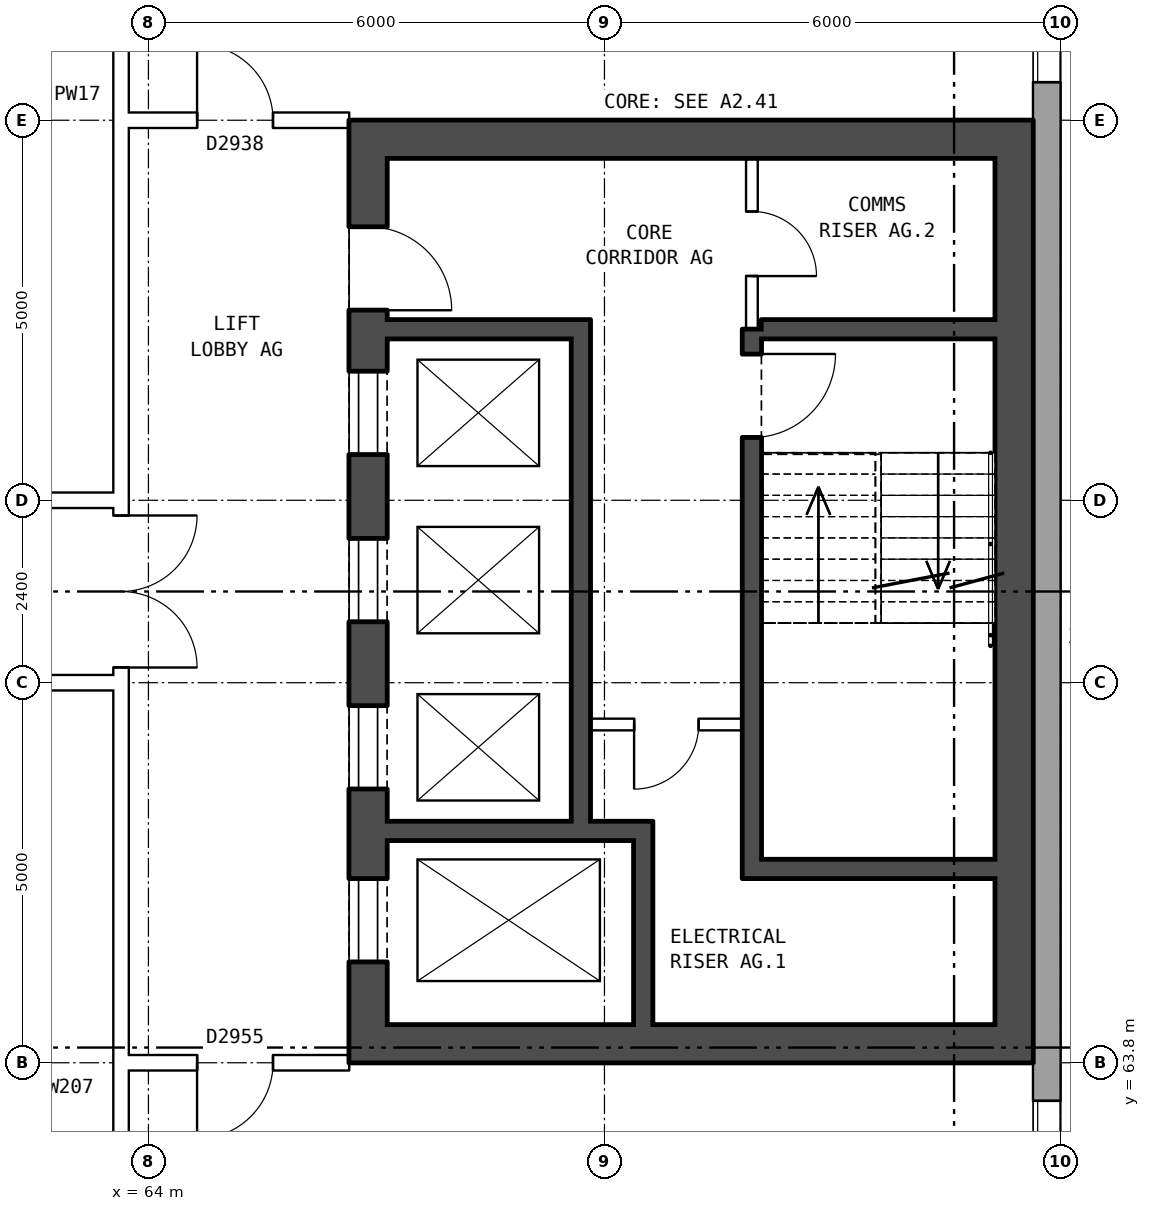
"""IFC4 building model, lengths in metres.
Left out: names, types, materials, properties, quantities, classifications, styles, units other than length and angle.
Written with IfcOpenShell. Run it as: python <this file> out.ifc"""

import sys

from ifc_helpers import new_model, si_unit, direction, frame, frame_2d, origin, place, context, subcontext, project, spatial, rectangle, extrude, element, fill, save


model = new_model("IFC4")
c1 = context("Model", 3, precision=1e-05, world=origin(), true_north=direction((0.0, 1.0)))
c2 = subcontext(c1, "Body", "Model", "MODEL_VIEW")
j1 = project(units=[si_unit("LENGTHUNIT", "METRE"), si_unit("PLANEANGLEUNIT", "RADIAN")], contexts=[c1])
p1 = place(None, origin())
s1 = spatial("IfcSite", under=j1, at=p1, CompositionType="ELEMENT")
p2 = place(p1, origin())
s2 = spatial("IfcBuilding", under=s1, at=p2, CompositionType="ELEMENT")
p3 = place(p2, frame((0.0, 0.0, 142.3)))
s3 = spatial("IfcBuildingStorey", under=s2, at=p3, CompositionType="ELEMENT", Elevation=142.3)
p4 = place(p3, frame((75.82, 57.075, 0.0), z_axis=(0.0, 0.0, 1.0), x_axis=(0.0, 1.0, 0.0)))
e1 = element("IfcWall", 1, at=p4, inside=s3, PredefinedType="STANDARD", context=c2, shape_type="SweptSolid", body=[
    extrude(rectangle(XDim=25.851, YDim=0.36, at=frame_2d((12.925, 0.0))), origin(), (0.0, 0.0, 1.0), 5.6),
])
p5 = place(p4, frame((1.625, 0.0, 0.15)))
e2 = element("IfcOpeningElement", 2, at=p5, cuts=e1, PredefinedType="OPENING", context=c2, shape_type="SweptSolid", body=[
    extrude(rectangle(XDim=1.6, YDim=2.4, at=frame_2d((0.8, 1.2))), frame((0.0, 0.19, 0.0), z_axis=(0.0, -1.0, 0.0), x_axis=(1.0, 0.0, 0.0)), (0.0, 0.0, 1.0), 0.38),
])
p6 = place(p4, frame((4.625, 0.0, 0.15)))
e3 = element("IfcOpeningElement", 3, at=p6, cuts=e1, PredefinedType="OPENING", context=c2, shape_type="SweptSolid", body=[
    extrude(rectangle(XDim=1.6, YDim=2.4, at=frame_2d((0.8, 1.2))), frame((0.0, 0.19, 0.0), z_axis=(0.0, -1.0, 0.0), x_axis=(1.0, 0.0, 0.0)), (0.0, 0.0, 1.0), 0.38),
])
p7 = place(p4, frame((19.625, 0.0, 0.15)))
e4 = element("IfcOpeningElement", 4, at=p7, cuts=e1, PredefinedType="OPENING", context=c2, shape_type="SweptSolid", body=[
    extrude(rectangle(XDim=1.6, YDim=2.4, at=frame_2d((0.8, 1.2))), frame((0.0, 0.19, 0.0), z_axis=(0.0, -1.0, 0.0), x_axis=(1.0, 0.0, 0.0)), (0.0, 0.0, 1.0), 0.38),
])
p8 = place(p4, frame((22.625, 0.0, 0.15)))
e5 = element("IfcOpeningElement", 5, at=p8, cuts=e1, PredefinedType="OPENING", context=c2, shape_type="SweptSolid", body=[
    extrude(rectangle(XDim=1.6, YDim=2.4, at=frame_2d((0.8, 1.2))), frame((0.0, 0.19, 0.0), z_axis=(0.0, -1.0, 0.0), x_axis=(1.0, 0.0, 0.0)), (0.0, 0.0, 1.0), 0.38),
])
p9 = place(p3, frame((66.89, 63.8, 0.0), z_axis=(0.0, 0.0, 1.0), x_axis=(0.0, 1.0, 0.0)))
e6 = element("IfcWall", 6, at=p9, inside=s3, PredefinedType="SHEAR", context=c2, shape_type="SweptSolid", body=[
    extrude(rectangle(XDim=12.4, YDim=0.5, at=frame_2d((6.2, 0.0))), origin(), (0.0, 0.0, 1.0), 5.6),
])
p10 = place(p9, frame((1.325, 0.0, 0.0)))
e7 = element("IfcOpeningElement", 7, at=p10, cuts=e6, PredefinedType="OPENING", context=c2, shape_type="SweptSolid", body=[
    extrude(rectangle(XDim=1.1, YDim=2.1, at=frame_2d((0.55, 1.05))), frame((0.0, 0.26, 0.0), z_axis=(0.0, -1.0, 0.0), x_axis=(1.0, 0.0, 0.0)), (0.0, 0.0, 1.0), 0.52),
])
p11 = place(p9, frame((3.6, 0.0, 0.0)))
e8 = element("IfcOpeningElement", 8, at=p11, cuts=e6, PredefinedType="OPENING", context=c2, shape_type="SweptSolid", body=[
    extrude(rectangle(XDim=1.1, YDim=2.1, at=frame_2d((0.55, 1.05))), frame((0.0, 0.26, 0.0), z_axis=(0.0, -1.0, 0.0), x_axis=(1.0, 0.0, 0.0)), (0.0, 0.0, 1.0), 0.52),
])
p12 = place(p9, frame((5.8, 0.0, 0.0)))
e9 = element("IfcOpeningElement", 9, at=p12, cuts=e6, PredefinedType="OPENING", context=c2, shape_type="SweptSolid", body=[
    extrude(rectangle(XDim=1.1, YDim=2.1, at=frame_2d((0.55, 1.05))), frame((0.0, 0.26, 0.0), z_axis=(0.0, -1.0, 0.0), x_axis=(1.0, 0.0, 0.0)), (0.0, 0.0, 1.0), 0.52),
])
p13 = place(p9, frame((8.0, 0.0, 0.0)))
e10 = element("IfcOpeningElement", 10, at=p13, cuts=e6, PredefinedType="OPENING", context=c2, shape_type="SweptSolid", body=[
    extrude(rectangle(XDim=1.1, YDim=2.1, at=frame_2d((0.55, 1.05))), frame((0.0, 0.26, 0.0), z_axis=(0.0, -1.0, 0.0), x_axis=(1.0, 0.0, 0.0)), (0.0, 0.0, 1.0), 0.52),
])
p14 = place(p9, frame((9.9, 0.0, 0.0)))
e11 = element("IfcOpeningElement", 11, at=p14, cuts=e6, PredefinedType="OPENING", context=c2, shape_type="SweptSolid", body=[
    extrude(rectangle(XDim=1.1, YDim=2.1, at=frame_2d((0.55, 1.05))), frame((0.0, 0.26, 0.0), z_axis=(0.0, -1.0, 0.0), x_axis=(1.0, 0.0, 0.0)), (0.0, 0.0, 1.0), 0.52),
])
p15 = place(p3, frame((75.39, 63.8, 0.0), z_axis=(0.0, 0.0, 1.0), x_axis=(0.0, 1.0, 0.0)))
e12 = element("IfcWall", 12, at=p15, inside=s3, PredefinedType="SHEAR", context=c2, shape_type="SweptSolid", body=[
    extrude(rectangle(XDim=12.4, YDim=0.5, at=frame_2d((6.2, 0.0))), origin(), (0.0, 0.0, 1.0), 5.6),
])
for number, where, z_axis, x_axis in (
    (13, (67.14, 64.05, 0.0), (0.0, 0.0, 1.0), (1.0, 0.0, 0.0)),
    (14, (67.14, 75.95, 0.0), (0.0, 0.0, 1.0), (1.0, 0.0, 0.0)),
):
    element("IfcWall", number, at=place(p3, frame(where, z_axis=z_axis, x_axis=x_axis)), inside=s3, PredefinedType="SHEAR", context=c2, shape_type="SweptSolid", body=[
        extrude(rectangle(XDim=8.0, YDim=0.5, at=frame_2d((4.0, 0.0))), origin(), (0.0, 0.0, 1.0), 5.6),
    ])
p16 = place(p3, frame((72.065, 66.35, 0.0), z_axis=(0.0, 0.0, 1.0), x_axis=(1.0, 0.0, 0.0)))
e15 = element("IfcWall", 15, at=p16, inside=s3, PredefinedType="SHEAR", context=c2, shape_type="SweptSolid", body=[
    extrude(rectangle(XDim=3.075, YDim=0.25, at=frame_2d((1.538, 0.0))), origin(), (0.0, 0.0, 1.0), 5.6),
])
p17 = place(p3, frame((67.14, 66.85, 0.0), z_axis=(0.0, 0.0, 1.0), x_axis=(1.0, 0.0, 0.0)))
e16 = element("IfcWall", 16, at=p17, inside=s3, PredefinedType="SHEAR", context=c2, shape_type="SweptSolid", body=[
    extrude(rectangle(XDim=3.495, YDim=0.25, at=frame_2d((1.748, 0.0))), origin(), (0.0, 0.0, 1.0), 5.6),
])
p18 = place(p3, frame((69.815, 68.25, 0.0), z_axis=(0.0, 0.0, 1.0), x_axis=(1.0, 0.0, 0.0)))
e17 = element("IfcWall", 17, at=p18, inside=s3, PredefinedType="PARTITIONING", context=c2, shape_type="SweptSolid", body=[
    extrude(rectangle(XDim=2.0, YDim=0.15, at=frame_2d((1.0, 0.0))), origin(), (0.0, 0.0, 1.0), 5.6),
])
p19 = place(p18, frame((0.575, 0.0, 0.0)))
e18 = element("IfcOpeningElement", 18, at=p19, cuts=e17, PredefinedType="OPENING", context=c2, shape_type="SweptSolid", body=[
    extrude(rectangle(XDim=0.85, YDim=2.1, at=frame_2d((0.425, 1.05))), frame((0.0, 0.085, 0.0), z_axis=(0.0, -1.0, 0.0), x_axis=(1.0, 0.0, 0.0)), (0.0, 0.0, 1.0), 0.17),
])
p20 = place(p3, frame((67.14, 73.45, 0.0), z_axis=(0.0, 0.0, 1.0), x_axis=(1.0, 0.0, 0.0)))
e19 = element("IfcWall", 19, at=p20, inside=s3, PredefinedType="SHEAR", context=c2, shape_type="SweptSolid", body=[
    extrude(rectangle(XDim=2.425, YDim=0.25, at=frame_2d((1.212, 0.0))), origin(), (0.0, 0.0, 1.0), 5.6),
])
p21 = place(p3, frame((72.065, 73.45, 0.0), z_axis=(0.0, 0.0, 1.0), x_axis=(1.0, 0.0, 0.0)))
e20 = element("IfcWall", 20, at=p21, inside=s3, PredefinedType="SHEAR", context=c2, shape_type="SweptSolid", body=[
    extrude(rectangle(XDim=3.075, YDim=0.25, at=frame_2d((1.538, 0.0))), origin(), (0.0, 0.0, 1.0), 5.6),
])
p22 = place(p3, frame((69.69, 66.975, 0.0), z_axis=(0.0, 0.0, 1.0), x_axis=(0.0, 1.0, 0.0)))
e21 = element("IfcWall", 21, at=p22, inside=s3, PredefinedType="SHEAR", context=c2, shape_type="SweptSolid", body=[
    extrude(rectangle(XDim=6.6, YDim=0.25, at=frame_2d((3.3, 0.0))), origin(), (0.0, 0.0, 1.0), 5.6),
])
p23 = place(p3, frame((70.51, 64.3, 0.0), z_axis=(0.0, 0.0, 1.0), x_axis=(0.0, 1.0, 0.0)))
e22 = element("IfcWall", 22, at=p23, inside=s3, PredefinedType="SHEAR", context=c2, shape_type="SweptSolid", body=[
    extrude(rectangle(XDim=2.425, YDim=0.25, at=frame_2d((1.212, 0.0))), origin(), (0.0, 0.0, 1.0), 5.6),
])
p24 = place(p3, frame((71.94, 66.225, 0.0), z_axis=(0.0, 0.0, 1.0), x_axis=(0.0, 1.0, 0.0)))
e23 = element("IfcWall", 23, at=p24, inside=s3, PredefinedType="SHEAR", context=c2, shape_type="SweptSolid", body=[
    extrude(rectangle(XDim=7.225, YDim=0.25, at=frame_2d((3.612, 0.0))), origin(), (0.0, 0.0, 1.0), 5.6),
])
p25 = place(p24, frame((5.8, 0.0, 0.0)))
e24 = element("IfcOpeningElement", 24, at=p25, cuts=e23, PredefinedType="OPENING", context=c2, shape_type="SweptSolid", body=[
    extrude(rectangle(XDim=1.1, YDim=2.1, at=frame_2d((0.55, 1.05))), frame((0.0, 0.135, 0.0), z_axis=(0.0, -1.0, 0.0), x_axis=(1.0, 0.0, 0.0)), (0.0, 0.0, 1.0), 0.27),
])
p26 = place(p3, frame((71.94, 73.45, 0.0), z_axis=(0.0, 0.0, 1.0), x_axis=(0.0, 1.0, 0.0)))
e25 = element("IfcWall", 25, at=p26, inside=s3, PredefinedType="PARTITIONING", context=c2, shape_type="SweptSolid", body=[
    extrude(rectangle(XDim=2.25, YDim=0.15, at=frame_2d((1.125, 0.0))), origin(), (0.0, 0.0, 1.0), 5.6),
])
p27 = place(p26, frame((0.7, 0.0, 0.0)))
e26 = element("IfcOpeningElement", 26, at=p27, cuts=e25, PredefinedType="OPENING", context=c2, shape_type="SweptSolid", body=[
    extrude(rectangle(XDim=0.85, YDim=2.1, at=frame_2d((0.425, 1.05))), frame((0.0, 0.085, 0.0), z_axis=(0.0, -1.0, 0.0), x_axis=(1.0, 0.0, 0.0)), (0.0, 0.0, 1.0), 0.17),
])
p28 = place(p3, frame((63.64, 63.9, 0.0), z_axis=(0.0, 0.0, 1.0), x_axis=(0.0, 1.0, 0.0)))
e27 = element("IfcWall", 27, at=p28, inside=s3, PredefinedType="PARTITIONING", context=c2, shape_type="SweptSolid", body=[
    extrude(rectangle(XDim=12.2, YDim=0.2, at=frame_2d((6.1, 0.0))), origin(), (0.0, 0.0, 1.0), 5.6),
])
p29 = place(p28, frame((5.1, 0.0, 0.0)))
e28 = element("IfcOpeningElement", 28, at=p29, cuts=e27, PredefinedType="OPENING", context=c2, shape_type="SweptSolid", body=[
    extrude(rectangle(XDim=2.0, YDim=2.1, at=frame_2d((1.0, 1.05))), frame((0.0, 0.11, 0.0), z_axis=(0.0, -1.0, 0.0), x_axis=(1.0, 0.0, 0.0)), (0.0, 0.0, 1.0), 0.22),
])
p30 = place(p3, frame((63.54, 63.8, 0.0), z_axis=(0.0, 0.0, 1.0), x_axis=(1.0, 0.0, 0.0)))
e29 = element("IfcWall", 29, at=p30, inside=s3, PredefinedType="PARTITIONING", context=c2, shape_type="SweptSolid", body=[
    extrude(rectangle(XDim=3.1, YDim=0.2, at=frame_2d((1.55, 0.0))), origin(), (0.0, 0.0, 1.0), 5.6),
])
p31 = place(p30, frame((1.1, 0.0, 0.0)))
e30 = element("IfcOpeningElement", 30, at=p31, cuts=e29, PredefinedType="OPENING", context=c2, shape_type="SweptSolid", body=[
    extrude(rectangle(XDim=1.0, YDim=2.1, at=frame_2d((0.5, 1.05))), frame((0.0, 0.11, 0.0), z_axis=(0.0, -1.0, 0.0), x_axis=(1.0, 0.0, 0.0)), (0.0, 0.0, 1.0), 0.22),
])
p32 = place(p3, frame((44.36, 68.8, 0.0), z_axis=(0.0, 0.0, 1.0), x_axis=(1.0, 0.0, 0.0)))
e31 = element("IfcWall", 31, at=p32, inside=s3, PredefinedType="PARTITIONING", context=c2, shape_type="SweptSolid", body=[
    extrude(rectangle(XDim=19.28, YDim=0.2, at=frame_2d((9.64, 0.0))), origin(), (0.0, 0.0, 1.0), 5.6),
])
p33 = place(p32, frame((6.32, 0.0, 0.0)))
e32 = element("IfcOpeningElement", 32, at=p33, cuts=e31, PredefinedType="OPENING", context=c2, shape_type="SweptSolid", body=[
    extrude(rectangle(XDim=1.0, YDim=2.1, at=frame_2d((0.5, 1.05))), frame((0.0, 0.11, 0.0), z_axis=(0.0, -1.0, 0.0), x_axis=(1.0, 0.0, 0.0)), (0.0, 0.0, 1.0), 0.22),
])
p34 = place(p3, frame((44.36, 71.2, 0.0), z_axis=(0.0, 0.0, 1.0), x_axis=(1.0, 0.0, 0.0)))
e33 = element("IfcWall", 33, at=p34, inside=s3, PredefinedType="PARTITIONING", context=c2, shape_type="SweptSolid", body=[
    extrude(rectangle(XDim=19.28, YDim=0.2, at=frame_2d((9.64, 0.0))), origin(), (0.0, 0.0, 1.0), 5.6),
])
p35 = place(p34, frame((8.64, 0.0, 0.0)))
e34 = element("IfcOpeningElement", 34, at=p35, cuts=e33, PredefinedType="OPENING", context=c2, shape_type="SweptSolid", body=[
    extrude(rectangle(XDim=1.0, YDim=2.1, at=frame_2d((0.5, 1.05))), frame((0.0, 0.11, 0.0), z_axis=(0.0, -1.0, 0.0), x_axis=(1.0, 0.0, 0.0)), (0.0, 0.0, 1.0), 0.22),
])
p36 = place(p3, frame((63.54, 76.2, 0.0), z_axis=(0.0, 0.0, 1.0), x_axis=(1.0, 0.0, 0.0)))
e35 = element("IfcWall", 35, at=p36, inside=s3, PredefinedType="PARTITIONING", context=c2, shape_type="SweptSolid", body=[
    extrude(rectangle(XDim=3.1, YDim=0.2, at=frame_2d((1.55, 0.0))), origin(), (0.0, 0.0, 1.0), 5.6),
])
p37 = place(p36, frame((1.1, 0.0, 0.0)))
e36 = element("IfcOpeningElement", 36, at=p37, cuts=e35, PredefinedType="OPENING", context=c2, shape_type="SweptSolid", body=[
    extrude(rectangle(XDim=1.0, YDim=2.1, at=frame_2d((0.5, 1.05))), frame((0.0, 0.11, 0.0), z_axis=(0.0, -1.0, 0.0), x_axis=(1.0, 0.0, 0.0)), (0.0, 0.0, 1.0), 0.22),
])
p38 = place(p3, frame((63.64, 60.7, 0.0), z_axis=(0.0, 0.0, 1.0), x_axis=(0.0, 1.0, 0.0)))
e37 = element("IfcWall", 37, at=p38, inside=s3, PredefinedType="PARTITIONING", context=c2, shape_type="SweptSolid", body=[
    extrude(rectangle(XDim=3.2, YDim=0.2, at=frame_2d((1.6, 0.0))), origin(), (0.0, 0.0, 1.0), 5.6),
])
p39 = place(p38, frame((1.1, 0.0, 0.0)))
e38 = element("IfcOpeningElement", 38, at=p39, cuts=e37, PredefinedType="OPENING", context=c2, shape_type="SweptSolid", body=[
    extrude(rectangle(XDim=1.0, YDim=2.1, at=frame_2d((0.5, 1.05))), frame((0.0, 0.11, 0.0), z_axis=(0.0, -1.0, 0.0), x_axis=(1.0, 0.0, 0.0)), (0.0, 0.0, 1.0), 0.22),
])
p40 = place(p3, frame((63.64, 76.1, 0.0), z_axis=(0.0, 0.0, 1.0), x_axis=(0.0, 1.0, 0.0)))
e39 = element("IfcWall", 39, at=p40, inside=s3, PredefinedType="PARTITIONING", context=c2, shape_type="SweptSolid", body=[
    extrude(rectangle(XDim=3.2, YDim=0.2, at=frame_2d((1.6, 0.0))), origin(), (0.0, 0.0, 1.0), 5.6),
])
p41 = place(p40, frame((1.1, 0.0, 0.0)))
e40 = element("IfcOpeningElement", 40, at=p41, cuts=e39, PredefinedType="OPENING", context=c2, shape_type="SweptSolid", body=[
    extrude(rectangle(XDim=1.0, YDim=2.1, at=frame_2d((0.5, 1.05))), frame((0.0, 0.11, 0.0), z_axis=(0.0, -1.0, 0.0), x_axis=(1.0, 0.0, 0.0)), (0.0, 0.0, 1.0), 0.22),
])
p42 = place(p6, origin())
e41 = element("IfcWindow", 41, at=p42, inside=s3, PartitioningType="SINGLE_PANEL", PredefinedType="WINDOW", context=c2, shape_type="SweptSolid", body=[
    extrude(rectangle(XDim=1.6, YDim=2.4, at=frame_2d((0.8, 1.2))), frame((0.0, 0.15, 0.0), z_axis=(0.0, -1.0, 0.0), x_axis=(1.0, 0.0, 0.0)), (0.0, 0.0, 1.0), 0.06),
])
fill(e3, e41)
p43 = place(p7, origin())
e42 = element("IfcWindow", 42, at=p43, inside=s3, PartitioningType="SINGLE_PANEL", PredefinedType="WINDOW", context=c2, shape_type="SweptSolid", body=[
    extrude(rectangle(XDim=1.6, YDim=2.4, at=frame_2d((0.8, 1.2))), frame((0.0, 0.15, 0.0), z_axis=(0.0, -1.0, 0.0), x_axis=(1.0, 0.0, 0.0)), (0.0, 0.0, 1.0), 0.06),
])
fill(e4, e42)
p44 = place(p10, origin())
e43 = element("IfcDoor", 43, at=p44, inside=s3, OperationType="DOUBLE_DOOR_SLIDING", PredefinedType="DOOR", context=c2, shape_type="SweptSolid", body=[
    extrude(rectangle(XDim=1.1, YDim=2.1, at=frame_2d((0.55, 1.05))), frame((0.0, -0.185, 0.0), z_axis=(0.0, -1.0, 0.0), x_axis=(1.0, 0.0, 0.0)), (0.0, 0.0, 1.0), 0.05),
])
fill(e7, e43)
p45 = place(p11, origin())
e44 = element("IfcDoor", 44, at=p45, inside=s3, OperationType="DOUBLE_DOOR_SLIDING", PredefinedType="DOOR", context=c2, shape_type="SweptSolid", body=[
    extrude(rectangle(XDim=1.1, YDim=2.1, at=frame_2d((0.55, 1.05))), frame((0.0, -0.185, 0.0), z_axis=(0.0, -1.0, 0.0), x_axis=(1.0, 0.0, 0.0)), (0.0, 0.0, 1.0), 0.05),
])
fill(e8, e44)
p46 = place(p12, origin())
e45 = element("IfcDoor", 45, at=p46, inside=s3, OperationType="DOUBLE_DOOR_SLIDING", PredefinedType="DOOR", context=c2, shape_type="SweptSolid", body=[
    extrude(rectangle(XDim=1.1, YDim=2.1, at=frame_2d((0.55, 1.05))), frame((0.0, -0.185, 0.0), z_axis=(0.0, -1.0, 0.0), x_axis=(1.0, 0.0, 0.0)), (0.0, 0.0, 1.0), 0.05),
])
fill(e9, e45)
p47 = place(p13, origin())
e46 = element("IfcDoor", 46, at=p47, inside=s3, OperationType="DOUBLE_DOOR_SLIDING", PredefinedType="DOOR", context=c2, shape_type="SweptSolid", body=[
    extrude(rectangle(XDim=1.1, YDim=2.1, at=frame_2d((0.55, 1.05))), frame((0.0, -0.185, 0.0), z_axis=(0.0, -1.0, 0.0), x_axis=(1.0, 0.0, 0.0)), (0.0, 0.0, 1.0), 0.05),
])
fill(e10, e46)
p48 = place(p14, frame((1.1, 0.0, 0.0), z_axis=(0.0, 0.0, 1.0), x_axis=(-1.0, 0.0, 0.0)))
e47 = element("IfcDoor", 47, at=p48, inside=s3, OperationType="SINGLE_SWING_RIGHT", PredefinedType="DOOR", context=c2, shape_type="SweptSolid", body=[
    extrude(rectangle(XDim=1.1, YDim=2.1, at=frame_2d((0.55, 1.05))), frame((0.0, 0.235, 0.0), z_axis=(0.0, -1.0, 0.0), x_axis=(1.0, 0.0, 0.0)), (0.0, 0.0, 1.0), 0.05),
])
fill(e11, e47)
p49 = place(p25, frame((1.1, 0.0, 0.0), z_axis=(0.0, 0.0, 1.0), x_axis=(-1.0, 0.0, 0.0)))
e48 = element("IfcDoor", 48, at=p49, inside=s3, OperationType="SINGLE_SWING_LEFT", PredefinedType="DOOR", context=c2, shape_type="SweptSolid", body=[
    extrude(rectangle(XDim=1.1, YDim=2.1, at=frame_2d((0.55, 1.05))), frame((0.0, 0.025, 0.0), z_axis=(0.0, -1.0, 0.0), x_axis=(1.0, 0.0, 0.0)), (0.0, 0.0, 1.0), 0.05),
])
fill(e24, e48)
p50 = place(p19, frame((0.85, 0.0, 0.0), z_axis=(0.0, 0.0, 1.0), x_axis=(-1.0, 0.0, 0.0)))
e49 = element("IfcDoor", 49, at=p50, inside=s3, OperationType="SINGLE_SWING_RIGHT", PredefinedType="DOOR", context=c2, shape_type="SweptSolid", body=[
    extrude(rectangle(XDim=0.85, YDim=2.1, at=frame_2d((0.425, 1.05))), frame((0.0, 0.025, 0.0), z_axis=(0.0, -1.0, 0.0), x_axis=(1.0, 0.0, 0.0)), (0.0, 0.0, 1.0), 0.05),
])
fill(e18, e49)
p51 = place(p27, frame((0.85, 0.0, 0.0), z_axis=(0.0, 0.0, 1.0), x_axis=(-1.0, 0.0, 0.0)))
e50 = element("IfcDoor", 50, at=p51, inside=s3, OperationType="SINGLE_SWING_RIGHT", PredefinedType="DOOR", context=c2, shape_type="SweptSolid", body=[
    extrude(rectangle(XDim=0.85, YDim=2.1, at=frame_2d((0.425, 1.05))), frame((0.0, 0.025, 0.0), z_axis=(0.0, -1.0, 0.0), x_axis=(1.0, 0.0, 0.0)), (0.0, 0.0, 1.0), 0.05),
])
fill(e26, e50)
p52 = place(p29, frame((2.0, 0.0, 0.0), z_axis=(0.0, 0.0, 1.0), x_axis=(-1.0, 0.0, 0.0)))
e51 = element("IfcDoor", 51, at=p52, inside=s3, OperationType="DOUBLE_DOOR_SINGLE_SWING", PredefinedType="DOOR", context=c2, shape_type="SweptSolid", body=[
    extrude(rectangle(XDim=2.0, YDim=2.1, at=frame_2d((1.0, 1.05))), frame((0.0, 0.025, 0.0), z_axis=(0.0, -1.0, 0.0), x_axis=(1.0, 0.0, 0.0)), (0.0, 0.0, 1.0), 0.05),
])
fill(e28, e51)
p53 = place(p31, frame((1.0, 0.0, 0.0), z_axis=(0.0, 0.0, 1.0), x_axis=(-1.0, 0.0, 0.0)))
e52 = element("IfcDoor", 52, at=p53, inside=s3, OperationType="SINGLE_SWING_RIGHT", PredefinedType="DOOR", context=c2, shape_type="SweptSolid", body=[
    extrude(rectangle(XDim=1.0, YDim=2.1, at=frame_2d((0.5, 1.05))), frame((0.0, 0.025, 0.0), z_axis=(0.0, -1.0, 0.0), x_axis=(1.0, 0.0, 0.0)), (0.0, 0.0, 1.0), 0.05),
])
fill(e30, e52)
p54 = place(p37, origin())
e53 = element("IfcDoor", 53, at=p54, inside=s3, OperationType="SINGLE_SWING_LEFT", PredefinedType="DOOR", context=c2, shape_type="SweptSolid", body=[
    extrude(rectangle(XDim=1.0, YDim=2.1, at=frame_2d((0.5, 1.05))), frame((0.0, 0.025, 0.0), z_axis=(0.0, -1.0, 0.0), x_axis=(1.0, 0.0, 0.0)), (0.0, 0.0, 1.0), 0.05),
])
fill(e36, e53)
save(model, sys.argv[1])
